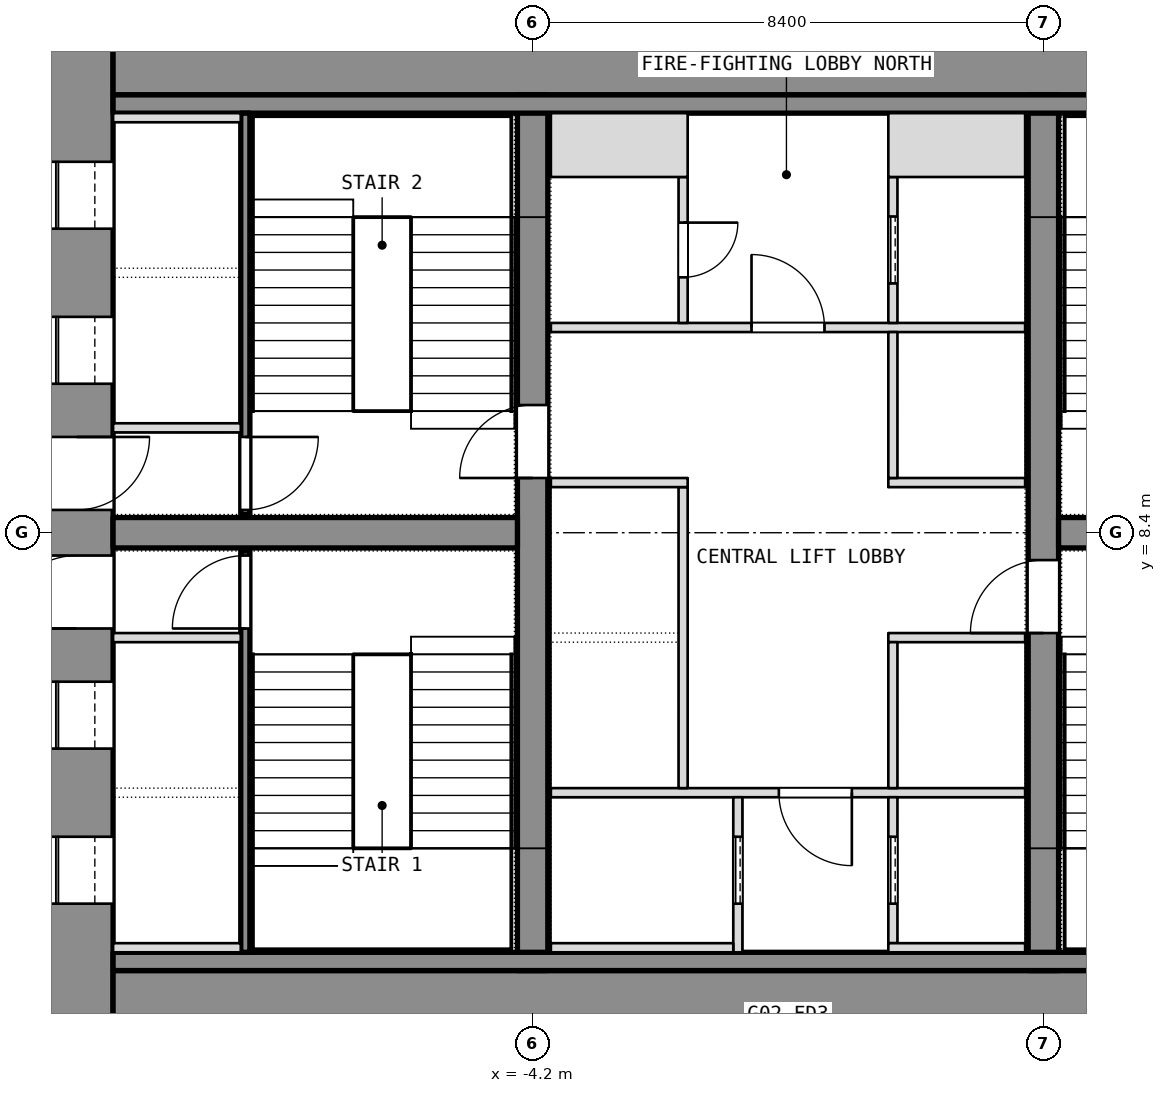
"""IFC4 building model, lengths in metres.
Left out: names, types, materials, properties, quantities, classifications, styles, units other than length and angle.
Written with IfcOpenShell. Run it as: python <this file> out.ifc"""

import sys

from ifc_helpers import new_model, si_unit, direction, frame, frame_2d, origin, place, context, subcontext, project, spatial, rectangle, extrude, element, fill, save


model = new_model("IFC4")
c1 = context("Model", 3, precision=1e-05, world=origin(), true_north=direction((0.0, 1.0)))
c2 = subcontext(c1, "Body", "Model", "MODEL_VIEW")
j1 = project(units=[si_unit("LENGTHUNIT", "METRE"), si_unit("PLANEANGLEUNIT", "RADIAN")], contexts=[c1])
p1 = place(None, origin())
s1 = spatial("IfcSite", under=j1, at=p1, CompositionType="ELEMENT")
p2 = place(p1, origin())
s2 = spatial("IfcBuilding", under=s1, at=p2, CompositionType="ELEMENT")
p3 = place(p2, frame((0.0, 0.0, 40.1)))
s3 = spatial("IfcBuildingStorey", under=s2, at=p3, CompositionType="ELEMENT", Elevation=40.1)
p4 = place(p3, frame((-11.7, 0.0, 0.0), z_axis=(0.0, 0.0, 1.0), x_axis=(0.0, 1.0, 0.0)))
e1 = element("IfcWall", 1, at=p4, inside=s3, PredefinedType="SHEAR", context=c2, shape_type="SweptSolid", body=[
    extrude(rectangle(XDim=16.8, YDim=1.2, at=frame_2d((8.4, 0.0))), origin(), (0.0, 0.0, 1.0), 3.6),
])
p5 = place(p4, frame((2.3, 0.0, 0.0)))
e2 = element("IfcOpeningElement", 2, at=p5, cuts=e1, PredefinedType="OPENING", context=c2, shape_type="SweptSolid", body=[
    extrude(rectangle(XDim=1.1, YDim=2.1, at=frame_2d((0.55, 1.05))), frame((0.0, 0.6, 0.0), z_axis=(0.0, -1.0, 0.0), x_axis=(1.0, 0.0, 0.0)), (0.0, 0.0, 1.0), 1.2),
])
p6 = place(p4, frame((4.85, 0.0, 0.0)))
e3 = element("IfcOpeningElement", 3, at=p6, cuts=e1, PredefinedType="OPENING", context=c2, shape_type="SweptSolid", body=[
    extrude(rectangle(XDim=1.1, YDim=2.1, at=frame_2d((0.55, 1.05))), frame((0.0, 0.6, 0.0), z_axis=(0.0, -1.0, 0.0), x_axis=(1.0, 0.0, 0.0)), (0.0, 0.0, 1.0), 1.2),
])
p7 = place(p4, frame((6.825, 0.0, 0.0)))
e4 = element("IfcOpeningElement", 4, at=p7, cuts=e1, PredefinedType="OPENING", context=c2, shape_type="SweptSolid", body=[
    extrude(rectangle(XDim=1.2, YDim=2.1, at=frame_2d((0.6, 1.05))), frame((0.0, 0.6, 0.0), z_axis=(0.0, -1.0, 0.0), x_axis=(1.0, 0.0, 0.0)), (0.0, 0.0, 1.0), 1.2),
])
p8 = place(p4, frame((13.4, 0.0, 0.0)))
e5 = element("IfcOpeningElement", 5, at=p8, cuts=e1, PredefinedType="OPENING", context=c2, shape_type="SweptSolid", body=[
    extrude(rectangle(XDim=1.1, YDim=2.1, at=frame_2d((0.55, 1.05))), frame((0.0, 0.6, 0.0), z_axis=(0.0, -1.0, 0.0), x_axis=(1.0, 0.0, 0.0)), (0.0, 0.0, 1.0), 1.2),
])
p9 = place(p4, frame((10.85, 0.0, 0.0)))
e6 = element("IfcOpeningElement", 6, at=p9, cuts=e1, PredefinedType="OPENING", context=c2, shape_type="SweptSolid", body=[
    extrude(rectangle(XDim=1.1, YDim=2.1, at=frame_2d((0.55, 1.05))), frame((0.0, 0.6, 0.0), z_axis=(0.0, -1.0, 0.0), x_axis=(1.0, 0.0, 0.0)), (0.0, 0.0, 1.0), 1.2),
])
p10 = place(p4, frame((8.775, 0.0, 0.0)))
e7 = element("IfcOpeningElement", 7, at=p10, cuts=e1, PredefinedType="OPENING", context=c2, shape_type="SweptSolid", body=[
    extrude(rectangle(XDim=1.2, YDim=2.1, at=frame_2d((0.6, 1.05))), frame((0.0, 0.6, 0.0), z_axis=(0.0, -1.0, 0.0), x_axis=(1.0, 0.0, 0.0)), (0.0, 0.0, 1.0), 1.2),
])
for number, where, z_axis, x_axis in (
    (8, (-11.1, 0.6, 0.0), (0.0, 0.0, 1.0), (1.0, 0.0, 0.0)),
    (9, (-11.1, 16.2, 0.0), (0.0, 0.0, 1.0), (1.0, 0.0, 0.0)),
):
    element("IfcWall", number, at=place(p3, frame(where, z_axis=z_axis, x_axis=x_axis)), inside=s3, PredefinedType="SHEAR", context=c2, shape_type="SweptSolid", body=[
        extrude(rectangle(XDim=22.2, YDim=1.2, at=frame_2d((11.1, 0.0))), origin(), (0.0, 0.0, 1.0), 3.6),
    ])
p11 = place(p3, frame((-4.2, 1.2, 0.0), z_axis=(0.0, 0.0, 1.0), x_axis=(0.0, 1.0, 0.0)))
e10 = element("IfcWall", 10, at=p11, inside=s3, PredefinedType="SHEAR", context=c2, shape_type="SweptSolid", body=[
    extrude(rectangle(XDim=14.4, YDim=0.5, at=frame_2d((7.2, 0.0))), origin(), (0.0, 0.0, 1.0), 3.6),
])
p12 = place(p11, frame((8.1, 0.0, 0.0)))
e11 = element("IfcOpeningElement", 11, at=p12, cuts=e10, PredefinedType="OPENING", context=c2, shape_type="SweptSolid", body=[
    extrude(rectangle(XDim=1.2, YDim=2.1, at=frame_2d((0.6, 1.05))), frame((0.0, 0.25, 0.0), z_axis=(0.0, -1.0, 0.0), x_axis=(1.0, 0.0, 0.0)), (0.0, 0.0, 1.0), 0.5),
])
p13 = place(p3, frame((4.2, 1.2, 0.0), z_axis=(0.0, 0.0, 1.0), x_axis=(0.0, 1.0, 0.0)))
e12 = element("IfcWall", 12, at=p13, inside=s3, PredefinedType="SHEAR", context=c2, shape_type="SweptSolid", body=[
    extrude(rectangle(XDim=14.4, YDim=0.5, at=frame_2d((7.2, 0.0))), origin(), (0.0, 0.0, 1.0), 3.6),
])
p14 = place(p13, frame((5.55, 0.0, 0.0)))
e13 = element("IfcOpeningElement", 13, at=p14, cuts=e12, PredefinedType="OPENING", context=c2, shape_type="SweptSolid", body=[
    extrude(rectangle(XDim=1.2, YDim=2.1, at=frame_2d((0.6, 1.05))), frame((0.0, 0.25, 0.0), z_axis=(0.0, -1.0, 0.0), x_axis=(1.0, 0.0, 0.0)), (0.0, 0.0, 1.0), 0.5),
])
for number, where, z_axis, x_axis in (
    (14, (-11.1, 8.4, 0.0), (0.0, 0.0, 1.0), (1.0, 0.0, 0.0)),
    (15, (4.45, 8.4, 0.0), (0.0, 0.0, 1.0), (1.0, 0.0, 0.0)),
):
    element("IfcWall", number, at=place(p3, frame(where, z_axis=z_axis, x_axis=x_axis)), inside=s3, PredefinedType="SHEAR", context=c2, shape_type="SweptSolid", body=[
        extrude(rectangle(XDim=6.65, YDim=0.5, at=frame_2d((3.325, 0.0))), origin(), (0.0, 0.0, 1.0), 3.6),
    ])
for number, where, z_axis, x_axis in (
    (16, (-11.1, 1.35, 0.0), (0.0, 0.0, 1.0), (1.0, 0.0, 0.0)),
    (17, (-11.1, 15.45, 0.0), (0.0, 0.0, 1.0), (1.0, 0.0, 0.0)),
):
    element("IfcWall", number, at=place(p3, frame(where, z_axis=z_axis, x_axis=x_axis)), inside=s3, PredefinedType="PARTITIONING", context=c2, shape_type="SweptSolid", body=[
        extrude(rectangle(XDim=22.2, YDim=0.3, at=frame_2d((11.1, 0.0))), origin(), (0.0, 0.0, 1.0), 3.34),
    ])
p15 = place(p3, frame((-8.925, 1.5, 0.0), z_axis=(0.0, 0.0, 1.0), x_axis=(0.0, 1.0, 0.0)))
e18 = element("IfcWall", 18, at=p15, inside=s3, PredefinedType="SHEAR", context=c2, shape_type="SweptSolid", body=[
    extrude(rectangle(XDim=6.6, YDim=0.15, at=frame_2d((3.3, 0.0))), origin(), (0.0, 0.0, 1.0), 3.34),
])
p16 = place(p15, frame((5.325, 0.0, 0.0)))
e19 = element("IfcOpeningElement", 19, at=p16, cuts=e18, PredefinedType="OPENING", context=c2, shape_type="SweptSolid", body=[
    extrude(rectangle(XDim=1.2, YDim=2.1, at=frame_2d((0.6, 1.05))), frame((0.0, 0.075, 0.0), z_axis=(0.0, -1.0, 0.0), x_axis=(1.0, 0.0, 0.0)), (0.0, 0.0, 1.0), 0.15),
])
for number, where, z_axis, x_axis in (
    (20, (-11.1, 6.675, 0.0), (0.0, 0.0, 1.0), (1.0, 0.0, 0.0)),
    (21, (-11.1, 1.575, 0.0), (0.0, 0.0, 1.0), (1.0, 0.0, 0.0)),
):
    element("IfcWall", number, at=place(p3, frame(where, z_axis=z_axis, x_axis=x_axis)), inside=s3, PredefinedType="SHEAR", context=c2, shape_type="SweptSolid", body=[
        extrude(rectangle(XDim=2.1, YDim=0.15, at=frame_2d((1.05, 0.0))), origin(), (0.0, 0.0, 1.0), 3.6),
    ])
p17 = place(p3, frame((-8.925, 8.7, 0.0), z_axis=(0.0, 0.0, 1.0), x_axis=(0.0, 1.0, 0.0)))
e22 = element("IfcWall", 22, at=p17, inside=s3, PredefinedType="SHEAR", context=c2, shape_type="SweptSolid", body=[
    extrude(rectangle(XDim=6.6, YDim=0.15, at=frame_2d((3.3, 0.0))), origin(), (0.0, 0.0, 1.0), 3.34),
])
p18 = place(p17, frame((0.075, 0.0, 0.0)))
e23 = element("IfcOpeningElement", 23, at=p18, cuts=e22, PredefinedType="OPENING", context=c2, shape_type="SweptSolid", body=[
    extrude(rectangle(XDim=1.2, YDim=2.1, at=frame_2d((0.6, 1.05))), frame((0.0, 0.075, 0.0), z_axis=(0.0, -1.0, 0.0), x_axis=(1.0, 0.0, 0.0)), (0.0, 0.0, 1.0), 0.15),
])
for number, where, z_axis, x_axis in (
    (24, (-11.1, 10.125, 0.0), (0.0, 0.0, 1.0), (1.0, 0.0, 0.0)),
    (25, (-11.1, 15.225, 0.0), (0.0, 0.0, 1.0), (1.0, 0.0, 0.0)),
):
    element("IfcWall", number, at=place(p3, frame(where, z_axis=z_axis, x_axis=x_axis)), inside=s3, PredefinedType="SHEAR", context=c2, shape_type="SweptSolid", body=[
        extrude(rectangle(XDim=2.1, YDim=0.15, at=frame_2d((1.05, 0.0))), origin(), (0.0, 0.0, 1.0), 3.6),
    ])
p19 = place(p3, frame((-3.9, 4.125, 0.0), z_axis=(0.0, 0.0, 1.0), x_axis=(1.0, 0.0, 0.0)))
e26 = element("IfcWall", 26, at=p19, inside=s3, PredefinedType="PARTITIONING", context=c2, shape_type="SweptSolid", body=[
    extrude(rectangle(XDim=7.8, YDim=0.15, at=frame_2d((3.9, 0.0))), origin(), (0.0, 0.0, 1.0), 3.34),
])
p20 = place(p19, frame((3.75, 0.0, 0.0)))
e27 = element("IfcOpeningElement", 27, at=p20, cuts=e26, PredefinedType="OPENING", context=c2, shape_type="SweptSolid", body=[
    extrude(rectangle(XDim=1.2, YDim=2.1, at=frame_2d((0.6, 1.05))), frame((0.0, 0.075, 0.0), z_axis=(0.0, -1.0, 0.0), x_axis=(1.0, 0.0, 0.0)), (0.0, 0.0, 1.0), 0.15),
])
p21 = place(p3, frame((-3.9, 11.775, 0.0), z_axis=(0.0, 0.0, 1.0), x_axis=(1.0, 0.0, 0.0)))
e28 = element("IfcWall", 28, at=p21, inside=s3, PredefinedType="PARTITIONING", context=c2, shape_type="SweptSolid", body=[
    extrude(rectangle(XDim=7.8, YDim=0.15, at=frame_2d((3.9, 0.0))), origin(), (0.0, 0.0, 1.0), 3.34),
])
p22 = place(p21, frame((3.3, 0.0, 0.0)))
e29 = element("IfcOpeningElement", 29, at=p22, cuts=e28, PredefinedType="OPENING", context=c2, shape_type="SweptSolid", body=[
    extrude(rectangle(XDim=1.2, YDim=2.1, at=frame_2d((0.6, 1.05))), frame((0.0, 0.075, 0.0), z_axis=(0.0, -1.0, 0.0), x_axis=(1.0, 0.0, 0.0)), (0.0, 0.0, 1.0), 0.15),
])
p23 = place(p3, frame((-0.825, 1.5, 0.0), z_axis=(0.0, 0.0, 1.0), x_axis=(0.0, 1.0, 0.0)))
e30 = element("IfcWall", 30, at=p23, inside=s3, PredefinedType="SHEAR", context=c2, shape_type="SweptSolid", body=[
    extrude(rectangle(XDim=2.55, YDim=0.15, at=frame_2d((1.275, 0.0))), origin(), (0.0, 0.0, 1.0), 3.6),
])
p24 = place(p23, frame((0.8, 0.0, 0.0)))
e31 = element("IfcOpeningElement", 31, at=p24, cuts=e30, PredefinedType="OPENING", context=c2, shape_type="SweptSolid", body=[
    extrude(rectangle(XDim=1.1, YDim=2.1, at=frame_2d((0.55, 1.05))), frame((0.0, 0.075, 0.0), z_axis=(0.0, -1.0, 0.0), x_axis=(1.0, 0.0, 0.0)), (0.0, 0.0, 1.0), 0.15),
])
p25 = place(p3, frame((-3.9, 1.575, 0.0), z_axis=(0.0, 0.0, 1.0), x_axis=(1.0, 0.0, 0.0)))
e32 = element("IfcWall", 32, at=p25, inside=s3, PredefinedType="SHEAR", context=c2, shape_type="SweptSolid", body=[
    extrude(rectangle(XDim=3.0, YDim=0.15, at=frame_2d((1.5, 0.0))), origin(), (0.0, 0.0, 1.0), 3.6),
])
p26 = place(p3, frame((-1.725, 4.2, 0.0), z_axis=(0.0, 0.0, 1.0), x_axis=(0.0, 1.0, 0.0)))
e33 = element("IfcWall", 33, at=p26, inside=s3, PredefinedType="SHEAR", context=c2, shape_type="SweptSolid", body=[
    extrude(rectangle(XDim=4.95, YDim=0.15, at=frame_2d((2.475, 0.0))), origin(), (0.0, 0.0, 1.0), 3.6),
])
p27 = place(p3, frame((-3.9, 9.225, 0.0), z_axis=(0.0, 0.0, 1.0), x_axis=(1.0, 0.0, 0.0)))
e34 = element("IfcWall", 34, at=p27, inside=s3, PredefinedType="SHEAR", context=c2, shape_type="SweptSolid", body=[
    extrude(rectangle(XDim=2.25, YDim=0.15, at=frame_2d((1.125, 0.0))), origin(), (0.0, 0.0, 1.0), 3.6),
])
p28 = place(p3, frame((-1.725, 11.85, 0.0), z_axis=(0.0, 0.0, 1.0), x_axis=(0.0, 1.0, 0.0)))
e35 = element("IfcWall", 35, at=p28, inside=s3, PredefinedType="PARTITIONING", context=c2, shape_type="SweptSolid", body=[
    extrude(rectangle(XDim=2.4, YDim=0.15, at=frame_2d((1.2, 0.0))), origin(), (0.0, 0.0, 1.0), 3.34),
])
p29 = place(p28, frame((0.75, 0.0, 0.0)))
e36 = element("IfcOpeningElement", 36, at=p29, cuts=e35, PredefinedType="OPENING", context=c2, shape_type="SweptSolid", body=[
    extrude(rectangle(XDim=0.9, YDim=2.1, at=frame_2d((0.45, 1.05))), frame((0.0, 0.075, 0.0), z_axis=(0.0, -1.0, 0.0), x_axis=(1.0, 0.0, 0.0)), (0.0, 0.0, 1.0), 0.15),
])
p30 = place(p3, frame((-3.9, 14.775, 0.0), z_axis=(0.0, 0.0, 1.0), x_axis=(1.0, 0.0, 0.0)))
e37 = element("IfcWall", 37, at=p30, inside=s3, PredefinedType="PARTITIONING", context=c2, shape_type="SweptSolid", body=[
    extrude(rectangle(XDim=2.25, YDim=1.05, at=frame_2d((1.125, 0.0))), origin(), (0.0, 0.0, 1.0), 3.34),
])
p31 = place(p3, frame((1.725, 1.65, 0.0), z_axis=(0.0, 0.0, 1.0), x_axis=(0.0, 1.0, 0.0)))
e38 = element("IfcWall", 38, at=p31, inside=s3, PredefinedType="SHEAR", context=c2, shape_type="SweptSolid", body=[
    extrude(rectangle(XDim=2.4, YDim=0.15, at=frame_2d((1.2, 0.0))), origin(), (0.0, 0.0, 1.0), 3.6),
])
p32 = place(p31, frame((0.65, 0.0, 0.0)))
e39 = element("IfcOpeningElement", 39, at=p32, cuts=e38, PredefinedType="OPENING", context=c2, shape_type="SweptSolid", body=[
    extrude(rectangle(XDim=1.1, YDim=2.1, at=frame_2d((0.55, 1.05))), frame((0.0, 0.075, 0.0), z_axis=(0.0, -1.0, 0.0), x_axis=(1.0, 0.0, 0.0)), (0.0, 0.0, 1.0), 0.15),
])
p33 = place(p3, frame((1.65, 1.575, 0.0), z_axis=(0.0, 0.0, 1.0), x_axis=(1.0, 0.0, 0.0)))
e40 = element("IfcWall", 40, at=p33, inside=s3, PredefinedType="SHEAR", context=c2, shape_type="SweptSolid", body=[
    extrude(rectangle(XDim=2.25, YDim=0.15, at=frame_2d((1.125, 0.0))), origin(), (0.0, 0.0, 1.0), 3.6),
])
p34 = place(p3, frame((1.725, 11.85, 0.0), z_axis=(0.0, 0.0, 1.0), x_axis=(0.0, 1.0, 0.0)))
e41 = element("IfcWall", 41, at=p34, inside=s3, PredefinedType="SHEAR", context=c2, shape_type="SweptSolid", body=[
    extrude(rectangle(XDim=2.4, YDim=0.15, at=frame_2d((1.2, 0.0))), origin(), (0.0, 0.0, 1.0), 3.6),
])
p35 = place(p34, frame((0.65, 0.0, 0.0)))
e42 = element("IfcOpeningElement", 42, at=p35, cuts=e41, PredefinedType="OPENING", context=c2, shape_type="SweptSolid", body=[
    extrude(rectangle(XDim=1.1, YDim=2.1, at=frame_2d((0.55, 1.05))), frame((0.0, 0.075, 0.0), z_axis=(0.0, -1.0, 0.0), x_axis=(1.0, 0.0, 0.0)), (0.0, 0.0, 1.0), 0.15),
])
p36 = place(p3, frame((1.65, 14.775, 0.0), z_axis=(0.0, 0.0, 1.0), x_axis=(1.0, 0.0, 0.0)))
e43 = element("IfcWall", 43, at=p36, inside=s3, PredefinedType="SHEAR", context=c2, shape_type="SweptSolid", body=[
    extrude(rectangle(XDim=2.25, YDim=1.05, at=frame_2d((1.125, 0.0))), origin(), (0.0, 0.0, 1.0), 3.6),
])
for number, where, z_axis, x_axis in (
    (44, (1.65, 6.675, 0.0), (0.0, 0.0, 1.0), (1.0, 0.0, 0.0)),
    (45, (1.65, 9.225, 0.0), (0.0, 0.0, 1.0), (1.0, 0.0, 0.0)),
):
    element("IfcWall", number, at=place(p3, frame(where, z_axis=z_axis, x_axis=x_axis)), inside=s3, PredefinedType="SHEAR", context=c2, shape_type="SweptSolid", body=[
        extrude(rectangle(XDim=2.25, YDim=0.15, at=frame_2d((1.125, 0.0))), origin(), (0.0, 0.0, 1.0), 3.6),
    ])
p37 = place(p3, frame((1.725, 4.2, 0.0), z_axis=(0.0, 0.0, 1.0), x_axis=(0.0, 1.0, 0.0)))
e46 = element("IfcWall", 46, at=p37, inside=s3, PredefinedType="SHEAR", context=c2, shape_type="SweptSolid", body=[
    extrude(rectangle(XDim=2.4, YDim=0.15, at=frame_2d((1.2, 0.0))), origin(), (0.0, 0.0, 1.0), 3.6),
])
p38 = place(p3, frame((1.725, 9.3, 0.0), z_axis=(0.0, 0.0, 1.0), x_axis=(0.0, 1.0, 0.0)))
e47 = element("IfcWall", 47, at=p38, inside=s3, PredefinedType="SHEAR", context=c2, shape_type="SweptSolid", body=[
    extrude(rectangle(XDim=2.4, YDim=0.15, at=frame_2d((1.2, 0.0))), origin(), (0.0, 0.0, 1.0), 3.6),
])
p39 = place(p5, origin())
e48 = element("IfcDoor", 48, at=p39, inside=s3, OperationType="SLIDING_TO_LEFT", PredefinedType="DOOR", context=c2, shape_type="SweptSolid", body=[
    extrude(rectangle(XDim=1.1, YDim=2.1, at=frame_2d((0.55, 1.05))), frame((0.0, 0.025, 0.0), z_axis=(0.0, -1.0, 0.0), x_axis=(1.0, 0.0, 0.0)), (0.0, 0.0, 1.0), 0.05),
])
fill(e2, e48)
p40 = place(p6, origin())
e49 = element("IfcDoor", 49, at=p40, inside=s3, OperationType="SLIDING_TO_LEFT", PredefinedType="DOOR", context=c2, shape_type="SweptSolid", body=[
    extrude(rectangle(XDim=1.1, YDim=2.1, at=frame_2d((0.55, 1.05))), frame((0.0, 0.025, 0.0), z_axis=(0.0, -1.0, 0.0), x_axis=(1.0, 0.0, 0.0)), (0.0, 0.0, 1.0), 0.05),
])
fill(e3, e49)
p41 = place(p7, origin())
e50 = element("IfcDoor", 50, at=p41, inside=s3, OperationType="SINGLE_SWING_LEFT", PredefinedType="DOOR", context=c2, shape_type="SweptSolid", body=[
    extrude(rectangle(XDim=1.2, YDim=2.1, at=frame_2d((0.6, 1.05))), frame((0.0, 0.025, 0.0), z_axis=(0.0, -1.0, 0.0), x_axis=(1.0, 0.0, 0.0)), (0.0, 0.0, 1.0), 0.05),
])
fill(e4, e50)
p42 = place(p16, origin())
e51 = element("IfcDoor", 51, at=p42, inside=s3, OperationType="SINGLE_SWING_LEFT", PredefinedType="DOOR", context=c2, shape_type="SweptSolid", body=[
    extrude(rectangle(XDim=1.2, YDim=2.1, at=frame_2d((0.6, 1.05))), frame((0.0, 0.025, 0.0), z_axis=(0.0, -1.0, 0.0), x_axis=(1.0, 0.0, 0.0)), (0.0, 0.0, 1.0), 0.05),
])
fill(e19, e51)
p43 = place(p8, origin())
e52 = element("IfcDoor", 52, at=p43, inside=s3, OperationType="SLIDING_TO_LEFT", PredefinedType="DOOR", context=c2, shape_type="SweptSolid", body=[
    extrude(rectangle(XDim=1.1, YDim=2.1, at=frame_2d((0.55, 1.05))), frame((0.0, 0.025, 0.0), z_axis=(0.0, -1.0, 0.0), x_axis=(1.0, 0.0, 0.0)), (0.0, 0.0, 1.0), 0.05),
])
fill(e5, e52)
p44 = place(p9, origin())
e53 = element("IfcDoor", 53, at=p44, inside=s3, OperationType="SLIDING_TO_LEFT", PredefinedType="DOOR", context=c2, shape_type="SweptSolid", body=[
    extrude(rectangle(XDim=1.1, YDim=2.1, at=frame_2d((0.55, 1.05))), frame((0.0, 0.025, 0.0), z_axis=(0.0, -1.0, 0.0), x_axis=(1.0, 0.0, 0.0)), (0.0, 0.0, 1.0), 0.05),
])
fill(e6, e53)
p45 = place(p10, origin())
e54 = element("IfcDoor", 54, at=p45, inside=s3, OperationType="SINGLE_SWING_LEFT", PredefinedType="DOOR", context=c2, shape_type="SweptSolid", body=[
    extrude(rectangle(XDim=1.2, YDim=2.1, at=frame_2d((0.6, 1.05))), frame((0.0, 0.025, 0.0), z_axis=(0.0, -1.0, 0.0), x_axis=(1.0, 0.0, 0.0)), (0.0, 0.0, 1.0), 0.05),
])
fill(e7, e54)
p46 = place(p18, origin())
e55 = element("IfcDoor", 55, at=p46, inside=s3, OperationType="SINGLE_SWING_LEFT", PredefinedType="DOOR", context=c2, shape_type="SweptSolid", body=[
    extrude(rectangle(XDim=1.2, YDim=2.1, at=frame_2d((0.6, 1.05))), frame((0.0, 0.025, 0.0), z_axis=(0.0, -1.0, 0.0), x_axis=(1.0, 0.0, 0.0)), (0.0, 0.0, 1.0), 0.05),
])
fill(e23, e55)
p47 = place(p24, origin())
e56 = element("IfcDoor", 56, at=p47, inside=s3, OperationType="SLIDING_TO_LEFT", PredefinedType="DOOR", context=c2, shape_type="SweptSolid", body=[
    extrude(rectangle(XDim=1.1, YDim=2.1, at=frame_2d((0.55, 1.05))), frame((0.0, 0.025, 0.0), z_axis=(0.0, -1.0, 0.0), x_axis=(1.0, 0.0, 0.0)), (0.0, 0.0, 1.0), 0.05),
])
fill(e31, e56)
p48 = place(p32, origin())
e57 = element("IfcDoor", 57, at=p48, inside=s3, OperationType="SLIDING_TO_LEFT", PredefinedType="DOOR", context=c2, shape_type="SweptSolid", body=[
    extrude(rectangle(XDim=1.1, YDim=2.1, at=frame_2d((0.55, 1.05))), frame((0.0, 0.025, 0.0), z_axis=(0.0, -1.0, 0.0), x_axis=(1.0, 0.0, 0.0)), (0.0, 0.0, 1.0), 0.05),
])
fill(e39, e57)
p49 = place(p35, origin())
e58 = element("IfcDoor", 58, at=p49, inside=s3, OperationType="SLIDING_TO_LEFT", PredefinedType="DOOR", context=c2, shape_type="SweptSolid", body=[
    extrude(rectangle(XDim=1.1, YDim=2.1, at=frame_2d((0.55, 1.05))), frame((0.0, 0.025, 0.0), z_axis=(0.0, -1.0, 0.0), x_axis=(1.0, 0.0, 0.0)), (0.0, 0.0, 1.0), 0.05),
])
fill(e42, e58)
p50 = place(p20, origin())
e59 = element("IfcDoor", 59, at=p50, inside=s3, OperationType="SINGLE_SWING_LEFT", PredefinedType="DOOR", context=c2, shape_type="SweptSolid", body=[
    extrude(rectangle(XDim=1.2, YDim=2.1, at=frame_2d((0.6, 1.05))), frame((0.0, 0.025, 0.0), z_axis=(0.0, -1.0, 0.0), x_axis=(1.0, 0.0, 0.0)), (0.0, 0.0, 1.0), 0.05),
])
fill(e27, e59)
p51 = place(p22, origin())
e60 = element("IfcDoor", 60, at=p51, inside=s3, OperationType="SINGLE_SWING_LEFT", PredefinedType="DOOR", context=c2, shape_type="SweptSolid", body=[
    extrude(rectangle(XDim=1.2, YDim=2.1, at=frame_2d((0.6, 1.05))), frame((0.0, 0.025, 0.0), z_axis=(0.0, -1.0, 0.0), x_axis=(1.0, 0.0, 0.0)), (0.0, 0.0, 1.0), 0.05),
])
fill(e29, e60)
p52 = place(p29, origin())
e61 = element("IfcDoor", 61, at=p52, inside=s3, OperationType="SINGLE_SWING_LEFT", PredefinedType="DOOR", context=c2, shape_type="SweptSolid", body=[
    extrude(rectangle(XDim=0.9, YDim=2.1, at=frame_2d((0.45, 1.05))), frame((0.0, 0.025, 0.0), z_axis=(0.0, -1.0, 0.0), x_axis=(1.0, 0.0, 0.0)), (0.0, 0.0, 1.0), 0.05),
])
fill(e36, e61)
p53 = place(p12, origin())
e62 = element("IfcDoor", 62, at=p53, inside=s3, OperationType="SINGLE_SWING_LEFT", PredefinedType="DOOR", context=c2, shape_type="SweptSolid", body=[
    extrude(rectangle(XDim=1.2, YDim=2.1, at=frame_2d((0.6, 1.05))), frame((0.0, 0.025, 0.0), z_axis=(0.0, -1.0, 0.0), x_axis=(1.0, 0.0, 0.0)), (0.0, 0.0, 1.0), 0.05),
])
fill(e11, e62)
p54 = place(p14, origin())
e63 = element("IfcDoor", 63, at=p54, inside=s3, OperationType="SINGLE_SWING_LEFT", PredefinedType="DOOR", context=c2, shape_type="SweptSolid", body=[
    extrude(rectangle(XDim=1.2, YDim=2.1, at=frame_2d((0.6, 1.05))), frame((0.0, 0.025, 0.0), z_axis=(0.0, -1.0, 0.0), x_axis=(1.0, 0.0, 0.0)), (0.0, 0.0, 1.0), 0.05),
])
fill(e13, e63)
save(model, sys.argv[1])
